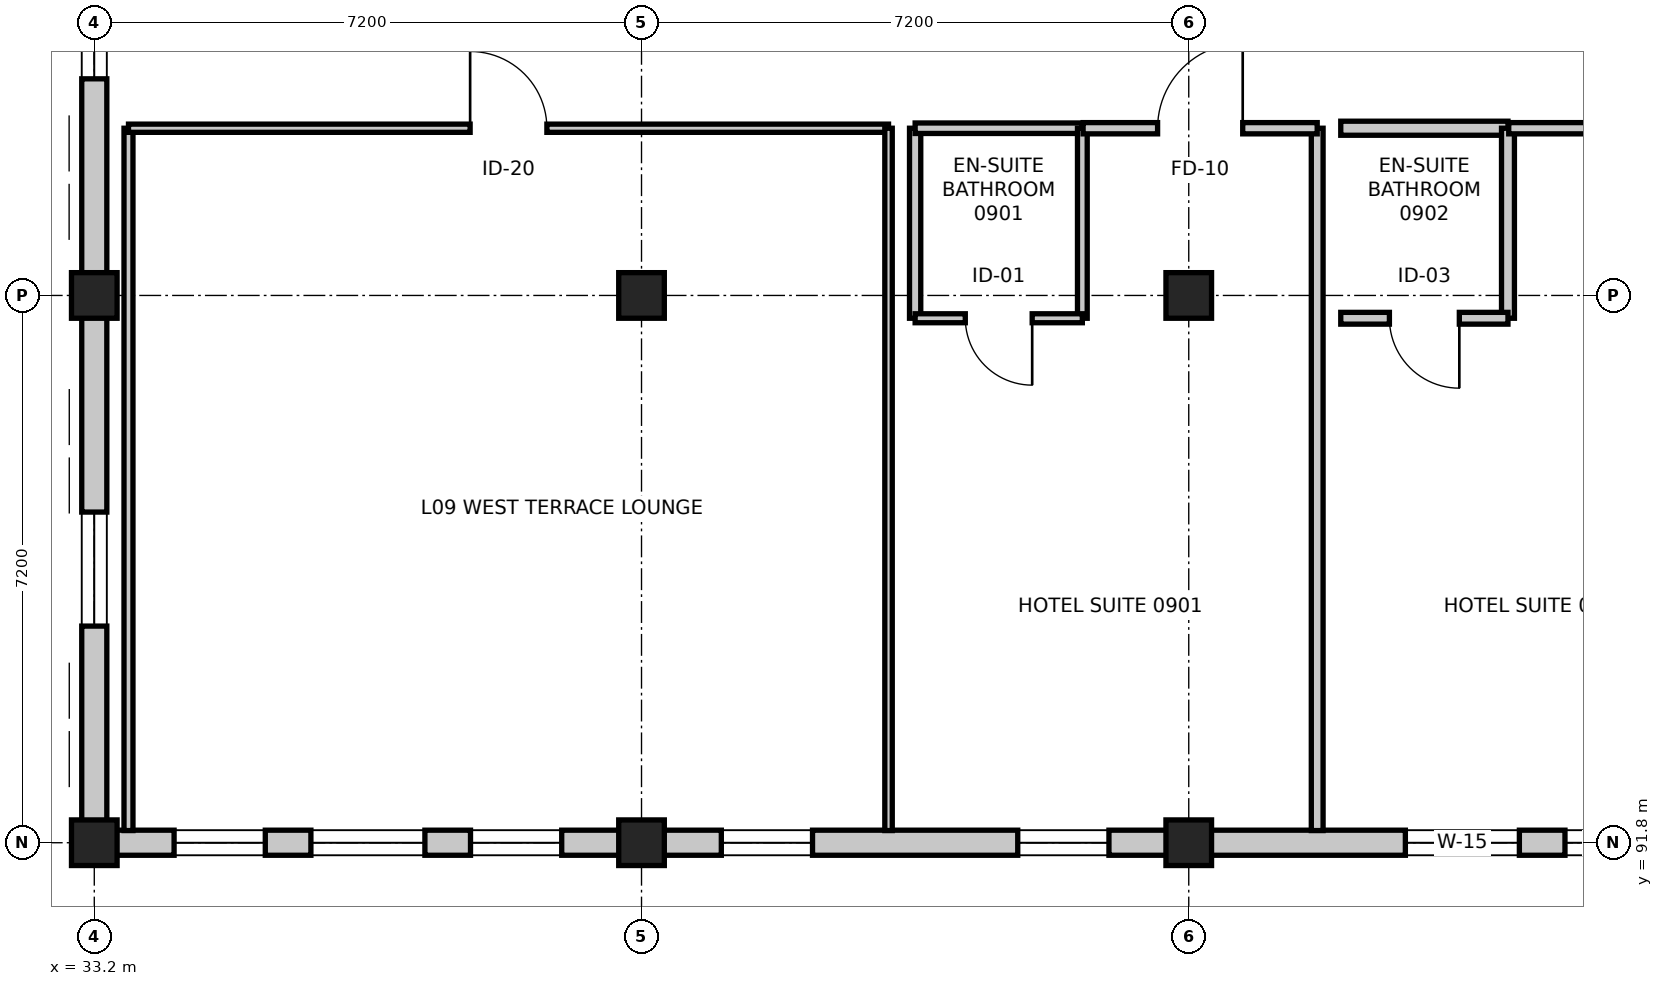
"""IFC4 building model, lengths in metres.
Left out: names, types, materials, properties, quantities, classifications, styles, units other than length and angle.
Written with IfcOpenShell. Run it as: python <this file> out.ifc"""

import sys

from ifc_helpers import new_model, si_unit, direction, frame, frame_2d, origin, origin_2d, place, context, subcontext, project, spatial, rectangle, extrude, element, fill, save


model = new_model("IFC4")
c1 = context("Model", 3, precision=1e-05, world=origin(), true_north=direction((0.0, 1.0)))
c2 = subcontext(c1, "Body", "Model", "MODEL_VIEW")
j1 = project(units=[si_unit("LENGTHUNIT", "METRE"), si_unit("PLANEANGLEUNIT", "RADIAN")], contexts=[c1])
p1 = place(None, origin())
s1 = spatial("IfcSite", under=j1, at=p1, CompositionType="ELEMENT")
p2 = place(p1, origin())
s2 = spatial("IfcBuilding", under=s1, at=p2, CompositionType="ELEMENT")
p3 = place(p2, frame((0.0, 0.0, 37.2)))
s3 = spatial("IfcBuildingStorey", under=s2, at=p3, CompositionType="ELEMENT", Elevation=37.2)
for number, where, z_axis, x_axis in (
    (1, (33.2, 91.8, 0.0), (0.0, 0.0, 1.0), (1.0, 0.0, 0.0)),
    (2, (33.2, 99.0, 0.0), (0.0, 0.0, 1.0), (1.0, 0.0, 0.0)),
    (3, (40.4, 91.8, 0.0), (0.0, 0.0, 1.0), (1.0, 0.0, 0.0)),
    (4, (40.4, 99.0, 0.0), (0.0, 0.0, 1.0), (1.0, 0.0, 0.0)),
    (5, (47.6, 91.8, 0.0), (0.0, 0.0, 1.0), (1.0, 0.0, 0.0)),
    (6, (47.6, 99.0, 0.0), (0.0, 0.0, 1.0), (1.0, 0.0, 0.0)),
):
    element("IfcColumn", number, at=place(p3, frame(where, z_axis=z_axis, x_axis=x_axis)), inside=s3, PredefinedType="COLUMN", context=c2, shape_type="SweptSolid", body=[
        extrude(rectangle(XDim=0.6, YDim=0.6, at=origin_2d()), origin(), (0.0, 0.0, 1.0), 3.6),
    ])
p4 = place(p3, frame((54.8, 91.8, 0.0), z_axis=(0.0, 0.0, 1.0), x_axis=(-1.0, 0.0, 0.0)))
e7 = element("IfcWall", 7, at=p4, inside=s3, PredefinedType="STANDARD", context=c2, shape_type="SweptSolid", body=[
    extrude(rectangle(XDim=7.2, YDim=0.33, at=frame_2d((3.6, 0.0))), origin(), (0.0, 0.0, 1.0), 2.765),
])
p5 = place(p4, frame((2.85, 0.0, 0.75)))
e8 = element("IfcOpeningElement", 8, at=p5, cuts=e7, PredefinedType="OPENING", context=c2, shape_type="SweptSolid", body=[
    extrude(rectangle(XDim=1.5, YDim=1.5, at=frame_2d((0.75, 0.75))), frame((0.0, 0.175, 0.0), z_axis=(0.0, -1.0, 0.0), x_axis=(1.0, 0.0, 0.0)), (0.0, 0.0, 1.0), 0.35),
])
p6 = place(p4, frame((1.05, 0.0, 0.85)))
e9 = element("IfcOpeningElement", 9, at=p6, cuts=e7, PredefinedType="OPENING", context=c2, shape_type="SweptSolid", body=[
    extrude(rectangle(XDim=1.2, YDim=1.8, at=frame_2d((0.6, 0.9))), frame((0.0, 0.175, 0.0), z_axis=(0.0, -1.0, 0.0), x_axis=(1.0, 0.0, 0.0)), (0.0, 0.0, 1.0), 0.35),
])
p7 = place(p3, frame((47.6, 91.8, 0.0), z_axis=(0.0, 0.0, 1.0), x_axis=(-1.0, 0.0, 0.0)))
e10 = element("IfcWall", 10, at=p7, inside=s3, PredefinedType="STANDARD", context=c2, shape_type="SweptSolid", body=[
    extrude(rectangle(XDim=7.2, YDim=0.33, at=frame_2d((3.6, 0.0))), origin(), (0.0, 0.0, 1.0), 2.765),
])
p8 = place(p7, frame((1.05, 0.0, 0.85)))
e11 = element("IfcOpeningElement", 11, at=p8, cuts=e10, PredefinedType="OPENING", context=c2, shape_type="SweptSolid", body=[
    extrude(rectangle(XDim=1.2, YDim=1.8, at=frame_2d((0.6, 0.9))), frame((0.0, 0.175, 0.0), z_axis=(0.0, -1.0, 0.0), x_axis=(1.0, 0.0, 0.0)), (0.0, 0.0, 1.0), 0.35),
])
p9 = place(p7, frame((4.95, 0.0, 0.85)))
e12 = element("IfcOpeningElement", 12, at=p9, cuts=e10, PredefinedType="OPENING", context=c2, shape_type="SweptSolid", body=[
    extrude(rectangle(XDim=1.2, YDim=1.8, at=frame_2d((0.6, 0.9))), frame((0.0, 0.175, 0.0), z_axis=(0.0, -1.0, 0.0), x_axis=(1.0, 0.0, 0.0)), (0.0, 0.0, 1.0), 0.35),
])
p10 = place(p3, frame((40.4, 91.8, 0.0), z_axis=(0.0, 0.0, 1.0), x_axis=(-1.0, 0.0, 0.0)))
e13 = element("IfcWall", 13, at=p10, inside=s3, PredefinedType="STANDARD", context=c2, shape_type="SweptSolid", body=[
    extrude(rectangle(XDim=7.2, YDim=0.33, at=frame_2d((3.6, 0.0))), origin(), (0.0, 0.0, 1.0), 2.765),
])
p11 = place(p10, frame((2.85, 0.0, 0.75)))
e14 = element("IfcOpeningElement", 14, at=p11, cuts=e13, PredefinedType="OPENING", context=c2, shape_type="SweptSolid", body=[
    extrude(rectangle(XDim=1.5, YDim=1.5, at=frame_2d((0.75, 0.75))), frame((0.0, 0.175, 0.0), z_axis=(0.0, -1.0, 0.0), x_axis=(1.0, 0.0, 0.0)), (0.0, 0.0, 1.0), 0.35),
])
p12 = place(p10, frame((1.05, 0.0, 0.85)))
e15 = element("IfcOpeningElement", 15, at=p12, cuts=e13, PredefinedType="OPENING", context=c2, shape_type="SweptSolid", body=[
    extrude(rectangle(XDim=1.2, YDim=1.8, at=frame_2d((0.6, 0.9))), frame((0.0, 0.175, 0.0), z_axis=(0.0, -1.0, 0.0), x_axis=(1.0, 0.0, 0.0)), (0.0, 0.0, 1.0), 0.35),
])
p13 = place(p10, frame((4.95, 0.0, 0.85)))
e16 = element("IfcOpeningElement", 16, at=p13, cuts=e13, PredefinedType="OPENING", context=c2, shape_type="SweptSolid", body=[
    extrude(rectangle(XDim=1.2, YDim=1.8, at=frame_2d((0.6, 0.9))), frame((0.0, 0.175, 0.0), z_axis=(0.0, -1.0, 0.0), x_axis=(1.0, 0.0, 0.0)), (0.0, 0.0, 1.0), 0.35),
])
p14 = place(p3, frame((33.2, 91.8, 0.0), z_axis=(0.0, 0.0, 1.0), x_axis=(0.0, 1.0, 0.0)))
e17 = element("IfcWall", 17, at=p14, inside=s3, PredefinedType="STANDARD", context=c2, shape_type="SweptSolid", body=[
    extrude(rectangle(XDim=7.2, YDim=0.33, at=frame_2d((3.6, 0.0))), origin(), (0.0, 0.0, 1.0), 2.715),
])
p15 = place(p14, frame((2.85, 0.0, 0.75)))
e18 = element("IfcOpeningElement", 18, at=p15, cuts=e17, PredefinedType="OPENING", context=c2, shape_type="SweptSolid", body=[
    extrude(rectangle(XDim=1.5, YDim=1.5, at=frame_2d((0.75, 0.75))), frame((0.0, 0.175, 0.0), z_axis=(0.0, -1.0, 0.0), x_axis=(1.0, 0.0, 0.0)), (0.0, 0.0, 1.0), 0.35),
])
p16 = place(p3, frame((33.2, 99.0, 0.0), z_axis=(0.0, 0.0, 1.0), x_axis=(0.0, 1.0, 0.0)))
e19 = element("IfcWall", 19, at=p16, inside=s3, PredefinedType="STANDARD", context=c2, shape_type="SweptSolid", body=[
    extrude(rectangle(XDim=7.2, YDim=0.33, at=frame_2d((3.6, 0.0))), origin(), (0.0, 0.0, 1.0), 2.715),
])
p17 = place(p16, frame((2.85, 0.0, 0.75)))
e20 = element("IfcOpeningElement", 20, at=p17, cuts=e19, PredefinedType="OPENING", context=c2, shape_type="SweptSolid", body=[
    extrude(rectangle(XDim=1.5, YDim=1.5, at=frame_2d((0.75, 0.75))), frame((0.0, 0.175, 0.0), z_axis=(0.0, -1.0, 0.0), x_axis=(1.0, 0.0, 0.0)), (0.0, 0.0, 1.0), 0.35),
])
p18 = place(p3, frame((33.65, 91.96, 0.0), z_axis=(0.0, 0.0, 1.0), x_axis=(0.0, 1.0, 0.0)))
e21 = element("IfcWall", 21, at=p18, inside=s3, PredefinedType="PARTITIONING", context=c2, shape_type="SweptSolid", body=[
    extrude(rectangle(XDim=9.24, YDim=0.118, at=frame_2d((4.62, 0.0))), origin(), (0.0, 0.0, 1.0), 2.765),
])
p19 = place(p3, frame((33.65, 101.2, 0.0), z_axis=(0.0, 0.0, 1.0), x_axis=(1.0, 0.0, 0.0)))
e22 = element("IfcWall", 22, at=p19, inside=s3, PredefinedType="PARTITIONING", context=c2, shape_type="SweptSolid", body=[
    extrude(rectangle(XDim=10.0, YDim=0.108, at=frame_2d((5.0, 0.0))), origin(), (0.0, 0.0, 1.0), 2.715),
])
p20 = place(p19, frame((4.495, 0.0, 0.0)))
e23 = element("IfcOpeningElement", 23, at=p20, cuts=e22, PredefinedType="OPENING", context=c2, shape_type="SweptSolid", body=[
    extrude(rectangle(XDim=1.01, YDim=2.16, at=frame_2d((0.505, 1.08))), frame((0.0, 0.064, 0.0), z_axis=(0.0, -1.0, 0.0), x_axis=(1.0, 0.0, 0.0)), (0.0, 0.0, 1.0), 0.128),
])
p21 = place(p3, frame((43.65, 101.2, 0.0), z_axis=(0.0, 0.0, 1.0), x_axis=(0.0, -1.0, 0.0)))
e24 = element("IfcWall", 24, at=p21, inside=s3, PredefinedType="PARTITIONING", context=c2, shape_type="SweptSolid", body=[
    extrude(rectangle(XDim=9.24, YDim=0.098, at=frame_2d((4.62, 0.0))), origin(), (0.0, 0.0, 1.0), 2.765),
])
p22 = place(p3, frame((44.0, 98.7, 0.0), z_axis=(0.0, 0.0, 1.0), x_axis=(0.0, 1.0, 0.0)))
e25 = element("IfcWall", 25, at=p22, inside=s3, PredefinedType="PARTITIONING", context=c2, shape_type="SweptSolid", body=[
    extrude(rectangle(XDim=2.5, YDim=0.148, at=frame_2d((1.25, 0.0))), origin(), (0.0, 0.0, 1.0), 2.765),
])
p23 = place(p3, frame((44.0, 101.2, 0.0), z_axis=(0.0, 0.0, 1.0), x_axis=(1.0, 0.0, 0.0)))
e26 = element("IfcWall", 26, at=p23, inside=s3, PredefinedType="PARTITIONING", context=c2, shape_type="SweptSolid", body=[
    extrude(rectangle(XDim=2.2, YDim=0.138, at=frame_2d((1.1, 0.0))), origin(), (0.0, 0.0, 1.0), 3.38),
])
p24 = place(p3, frame((46.2, 101.2, 0.0), z_axis=(0.0, 0.0, 1.0), x_axis=(0.0, -1.0, 0.0)))
e27 = element("IfcWall", 27, at=p24, inside=s3, PredefinedType="PARTITIONING", context=c2, shape_type="SweptSolid", body=[
    extrude(rectangle(XDim=2.5, YDim=0.128, at=frame_2d((1.25, 0.0))), origin(), (0.0, 0.0, 1.0), 2.765),
])
p25 = place(p3, frame((46.2, 98.7, 0.0), z_axis=(0.0, 0.0, 1.0), x_axis=(-1.0, 0.0, 0.0)))
e28 = element("IfcWall", 28, at=p25, inside=s3, PredefinedType="PARTITIONING", context=c2, shape_type="SweptSolid", body=[
    extrude(rectangle(XDim=2.2, YDim=0.118, at=frame_2d((1.1, 0.0))), origin(), (0.0, 0.0, 1.0), 3.38),
])
p26 = place(p25, frame((0.66, 0.0, 0.0)))
e29 = element("IfcOpeningElement", 29, at=p26, cuts=e28, PredefinedType="OPENING", context=c2, shape_type="SweptSolid", body=[
    extrude(rectangle(XDim=0.88, YDim=2.06, at=frame_2d((0.44, 1.03))), frame((0.0, 0.069, 0.0), z_axis=(0.0, -1.0, 0.0), x_axis=(1.0, 0.0, 0.0)), (0.0, 0.0, 1.0), 0.138),
])
p27 = place(p3, frame((49.29, 101.2, 0.0), z_axis=(0.0, 0.0, 1.0), x_axis=(0.0, -1.0, 0.0)))
e30 = element("IfcWall", 30, at=p27, inside=s3, PredefinedType="PARTITIONING", context=c2, shape_type="SweptSolid", body=[
    extrude(rectangle(XDim=9.24, YDim=0.155, at=frame_2d((4.62, 0.0))), origin(), (0.0, 0.0, 1.0), 2.765),
])
p28 = place(p3, frame((46.21, 101.2, 0.0), z_axis=(0.0, 0.0, 1.0), x_axis=(1.0, 0.0, 0.0)))
e31 = element("IfcWall", 31, at=p28, inside=s3, PredefinedType="PARTITIONING", context=c2, shape_type="SweptSolid", body=[
    extrude(rectangle(XDim=3.08, YDim=0.148, at=frame_2d((1.54, 0.0))), origin(), (0.0, 0.0, 1.0), 2.715),
])
p29 = place(p28, frame((0.98, 0.0, 0.0)))
e32 = element("IfcOpeningElement", 32, at=p29, cuts=e31, PredefinedType="OPENING", context=c2, shape_type="SweptSolid", body=[
    extrude(rectangle(XDim=1.12, YDim=2.2, at=frame_2d((0.56, 1.1))), frame((0.0, 0.084, 0.0), z_axis=(0.0, -1.0, 0.0), x_axis=(1.0, 0.0, 0.0)), (0.0, 0.0, 1.0), 0.168),
])
p30 = place(p3, frame((49.6, 101.2, 0.0), z_axis=(0.0, 0.0, 1.0), x_axis=(1.0, 0.0, 0.0)))
e33 = element("IfcWall", 33, at=p30, inside=s3, PredefinedType="PARTITIONING", context=c2, shape_type="SweptSolid", body=[
    extrude(rectangle(XDim=2.2, YDim=0.185, at=frame_2d((1.1, 0.0))), origin(), (0.0, 0.0, 1.0), 3.38),
])
p31 = place(p3, frame((51.8, 101.2, 0.0), z_axis=(0.0, 0.0, 1.0), x_axis=(0.0, -1.0, 0.0)))
e34 = element("IfcWall", 34, at=p31, inside=s3, PredefinedType="PARTITIONING", context=c2, shape_type="SweptSolid", body=[
    extrude(rectangle(XDim=2.5, YDim=0.17, at=frame_2d((1.25, 0.0))), origin(), (0.0, 0.0, 1.0), 2.765),
])
p32 = place(p3, frame((51.8, 98.7, 0.0), z_axis=(0.0, 0.0, 1.0), x_axis=(-1.0, 0.0, 0.0)))
e35 = element("IfcWall", 35, at=p32, inside=s3, PredefinedType="PARTITIONING", context=c2, shape_type="SweptSolid", body=[
    extrude(rectangle(XDim=2.2, YDim=0.155, at=frame_2d((1.1, 0.0))), origin(), (0.0, 0.0, 1.0), 3.38),
])
p33 = place(p32, frame((0.64, 0.0, 0.0)))
e36 = element("IfcOpeningElement", 36, at=p33, cuts=e35, PredefinedType="OPENING", context=c2, shape_type="SweptSolid", body=[
    extrude(rectangle(XDim=0.92, YDim=2.1, at=frame_2d((0.46, 1.05))), frame((0.0, 0.087, 0.0), z_axis=(0.0, -1.0, 0.0), x_axis=(1.0, 0.0, 0.0)), (0.0, 0.0, 1.0), 0.175),
])
p34 = place(p3, frame((51.81, 101.2, 0.0), z_axis=(0.0, 0.0, 1.0), x_axis=(1.0, 0.0, 0.0)))
e37 = element("IfcWall", 37, at=p34, inside=s3, PredefinedType="PARTITIONING", context=c2, shape_type="SweptSolid", body=[
    extrude(rectangle(XDim=3.08, YDim=0.148, at=frame_2d((1.54, 0.0))), origin(), (0.0, 0.0, 1.0), 2.715),
])
p35 = place(p34, frame((1.05, 0.0, 0.0)))
e38 = element("IfcOpeningElement", 38, at=p35, cuts=e37, PredefinedType="OPENING", context=c2, shape_type="SweptSolid", body=[
    extrude(rectangle(XDim=0.98, YDim=2.15, at=frame_2d((0.49, 1.075))), frame((0.0, 0.084, 0.0), z_axis=(0.0, -1.0, 0.0), x_axis=(1.0, 0.0, 0.0)), (0.0, 0.0, 1.0), 0.168),
])
p36 = place(p5, origin())
e39 = element("IfcWindow", 39, at=p36, inside=s3, PartitioningType="SINGLE_PANEL", PredefinedType="WINDOW", context=c2, shape_type="SweptSolid", body=[
    extrude(rectangle(XDim=1.5, YDim=1.5, at=frame_2d((0.75, 0.75))), frame((0.0, 0.03, 0.0), z_axis=(0.0, -1.0, 0.0), x_axis=(1.0, 0.0, 0.0)), (0.0, 0.0, 1.0), 0.06),
])
fill(e8, e39)
p37 = place(p6, origin())
e40 = element("IfcWindow", 40, at=p37, inside=s3, PartitioningType="SINGLE_PANEL", PredefinedType="WINDOW", context=c2, shape_type="SweptSolid", body=[
    extrude(rectangle(XDim=1.2, YDim=1.8, at=frame_2d((0.6, 0.9))), frame((0.0, 0.03, 0.0), z_axis=(0.0, -1.0, 0.0), x_axis=(1.0, 0.0, 0.0)), (0.0, 0.0, 1.0), 0.06),
])
fill(e9, e40)
p38 = place(p8, origin())
e41 = element("IfcWindow", 41, at=p38, inside=s3, PartitioningType="SINGLE_PANEL", PredefinedType="WINDOW", context=c2, shape_type="SweptSolid", body=[
    extrude(rectangle(XDim=1.2, YDim=1.8, at=frame_2d((0.6, 0.9))), frame((0.0, 0.03, 0.0), z_axis=(0.0, -1.0, 0.0), x_axis=(1.0, 0.0, 0.0)), (0.0, 0.0, 1.0), 0.06),
])
fill(e11, e41)
p39 = place(p9, origin())
e42 = element("IfcWindow", 42, at=p39, inside=s3, PartitioningType="SINGLE_PANEL", PredefinedType="WINDOW", context=c2, shape_type="SweptSolid", body=[
    extrude(rectangle(XDim=1.2, YDim=1.8, at=frame_2d((0.6, 0.9))), frame((0.0, 0.03, 0.0), z_axis=(0.0, -1.0, 0.0), x_axis=(1.0, 0.0, 0.0)), (0.0, 0.0, 1.0), 0.06),
])
fill(e12, e42)
p40 = place(p11, origin())
e43 = element("IfcWindow", 43, at=p40, inside=s3, PartitioningType="SINGLE_PANEL", PredefinedType="WINDOW", context=c2, shape_type="SweptSolid", body=[
    extrude(rectangle(XDim=1.5, YDim=1.5, at=frame_2d((0.75, 0.75))), frame((0.0, 0.03, 0.0), z_axis=(0.0, -1.0, 0.0), x_axis=(1.0, 0.0, 0.0)), (0.0, 0.0, 1.0), 0.06),
])
fill(e14, e43)
p41 = place(p12, origin())
e44 = element("IfcWindow", 44, at=p41, inside=s3, PartitioningType="SINGLE_PANEL", PredefinedType="WINDOW", context=c2, shape_type="SweptSolid", body=[
    extrude(rectangle(XDim=1.2, YDim=1.8, at=frame_2d((0.6, 0.9))), frame((0.0, 0.03, 0.0), z_axis=(0.0, -1.0, 0.0), x_axis=(1.0, 0.0, 0.0)), (0.0, 0.0, 1.0), 0.06),
])
fill(e15, e44)
p42 = place(p13, origin())
e45 = element("IfcWindow", 45, at=p42, inside=s3, PartitioningType="SINGLE_PANEL", PredefinedType="WINDOW", context=c2, shape_type="SweptSolid", body=[
    extrude(rectangle(XDim=1.2, YDim=1.8, at=frame_2d((0.6, 0.9))), frame((0.0, 0.03, 0.0), z_axis=(0.0, -1.0, 0.0), x_axis=(1.0, 0.0, 0.0)), (0.0, 0.0, 1.0), 0.06),
])
fill(e16, e45)
p43 = place(p15, origin())
e46 = element("IfcWindow", 46, at=p43, inside=s3, PartitioningType="SINGLE_PANEL", PredefinedType="WINDOW", context=c2, shape_type="SweptSolid", body=[
    extrude(rectangle(XDim=1.5, YDim=1.5, at=frame_2d((0.75, 0.75))), frame((0.0, 0.03, 0.0), z_axis=(0.0, -1.0, 0.0), x_axis=(1.0, 0.0, 0.0)), (0.0, 0.0, 1.0), 0.06),
])
fill(e18, e46)
p44 = place(p17, origin())
e47 = element("IfcWindow", 47, at=p44, inside=s3, PartitioningType="SINGLE_PANEL", PredefinedType="WINDOW", context=c2, shape_type="SweptSolid", body=[
    extrude(rectangle(XDim=1.5, YDim=1.5, at=frame_2d((0.75, 0.75))), frame((0.0, 0.03, 0.0), z_axis=(0.0, -1.0, 0.0), x_axis=(1.0, 0.0, 0.0)), (0.0, 0.0, 1.0), 0.06),
])
fill(e20, e47)
p45 = place(p20, origin())
e48 = element("IfcDoor", 48, at=p45, inside=s3, OperationType="SINGLE_SWING_LEFT", PredefinedType="DOOR", context=c2, shape_type="SweptSolid", body=[
    extrude(rectangle(XDim=1.01, YDim=2.16, at=frame_2d((0.505, 1.08))), frame((0.0, 0.025, 0.0), z_axis=(0.0, -1.0, 0.0), x_axis=(1.0, 0.0, 0.0)), (0.0, 0.0, 1.0), 0.05),
])
fill(e23, e48)
p46 = place(p26, origin())
e49 = element("IfcDoor", 49, at=p46, inside=s3, OperationType="SINGLE_SWING_LEFT", PredefinedType="DOOR", context=c2, shape_type="SweptSolid", body=[
    extrude(rectangle(XDim=0.88, YDim=2.06, at=frame_2d((0.44, 1.03))), frame((0.0, 0.025, 0.0), z_axis=(0.0, -1.0, 0.0), x_axis=(1.0, 0.0, 0.0)), (0.0, 0.0, 1.0), 0.05),
])
fill(e29, e49)
p47 = place(p29, origin())
e50 = element("IfcDoor", 50, at=p47, inside=s3, OperationType="SINGLE_SWING_RIGHT", PredefinedType="DOOR", context=c2, shape_type="SweptSolid", body=[
    extrude(rectangle(XDim=1.12, YDim=2.2, at=frame_2d((0.56, 1.1))), frame((0.0, 0.025, 0.0), z_axis=(0.0, -1.0, 0.0), x_axis=(1.0, 0.0, 0.0)), (0.0, 0.0, 1.0), 0.05),
])
fill(e32, e50)
p48 = place(p33, origin())
e51 = element("IfcDoor", 51, at=p48, inside=s3, OperationType="SINGLE_SWING_LEFT", PredefinedType="DOOR", context=c2, shape_type="SweptSolid", body=[
    extrude(rectangle(XDim=0.92, YDim=2.1, at=frame_2d((0.46, 1.05))), frame((0.0, 0.025, 0.0), z_axis=(0.0, -1.0, 0.0), x_axis=(1.0, 0.0, 0.0)), (0.0, 0.0, 1.0), 0.05),
])
fill(e36, e51)
save(model, sys.argv[1])
